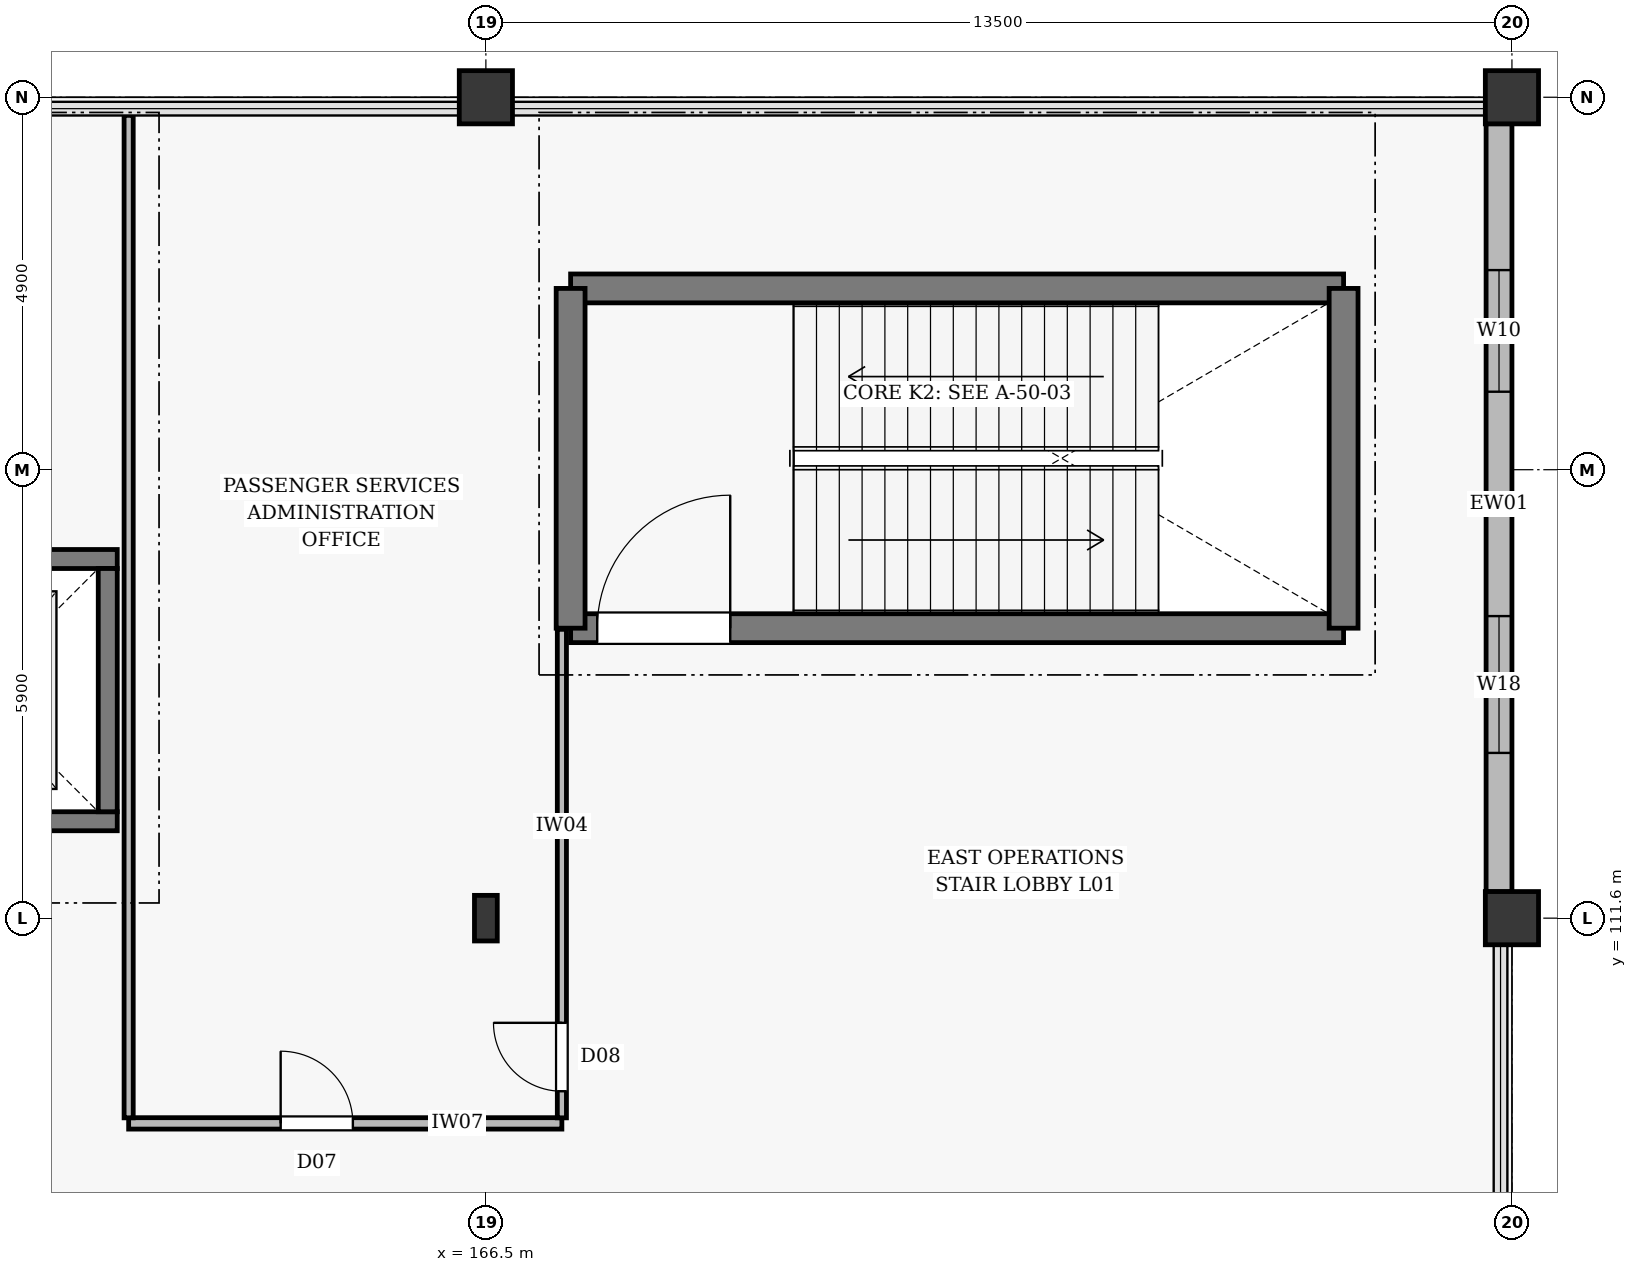
"""IFC4 building model, lengths in metres.
Left out: names, types, materials, properties, quantities, classifications, styles, units other than length and angle.
Written with IfcOpenShell. Run it as: python <this file> out.ifc"""

import sys

from ifc_helpers import new_model, si_unit, direction, frame, frame_2d, origin, origin_2d, place, context, subcontext, project, spatial, rectangle, i_section, extrude, element, fill, save


model = new_model("IFC4")
c1 = context("Model", 3, precision=1e-05, world=origin(), true_north=direction((0.0, 1.0)))
c2 = subcontext(c1, "Body", "Model", "MODEL_VIEW")
j1 = project(units=[si_unit("LENGTHUNIT", "METRE"), si_unit("PLANEANGLEUNIT", "RADIAN")], contexts=[c1])
p1 = place(None, origin())
s1 = spatial("IfcSite", under=j1, at=p1, CompositionType="ELEMENT")
p2 = place(p1, origin())
s2 = spatial("IfcBuilding", under=s1, at=p2, CompositionType="ELEMENT")
p3 = place(p2, frame((0.0, 0.0, 6.6)))
s3 = spatial("IfcBuildingStorey", under=s2, at=p3, CompositionType="ELEMENT", Elevation=6.6)
p4 = place(p3, frame((166.5, 111.6, 0.0), z_axis=(0.0, 0.0, 1.0), x_axis=(1.0, 0.0, 0.0)))
e1 = element("IfcColumn", 1, at=p4, inside=s3, PredefinedType="COLUMN", context=c2, shape_type="SweptSolid", body=[
    extrude(i_section(OverallWidth=0.3, OverallDepth=0.6, WebThickness=0.015, FlangeThickness=0.029, at=origin_2d()), origin(), (0.0, 0.0, 1.0), 6.0),
])
for number, where, z_axis, x_axis in (
    (2, (166.5, 122.4, 0.0), (0.0, 0.0, 1.0), (1.0, 0.0, 0.0)),
    (3, (180.0, 111.6, 0.0), (0.0, 0.0, 1.0), (1.0, 0.0, 0.0)),
    (4, (180.0, 122.4, 0.0), (0.0, 0.0, 1.0), (1.0, 0.0, 0.0)),
):
    element("IfcColumn", number, at=place(p3, frame(where, z_axis=z_axis, x_axis=x_axis)), inside=s3, PredefinedType="COLUMN", context=c2, shape_type="SweptSolid", body=[
        extrude(rectangle(XDim=0.7, YDim=0.7, at=origin_2d()), origin(), (0.0, 0.0, 1.0), 6.0),
    ])
p5 = place(p3, frame((179.83, 122.052, 0.0), z_axis=(0.0, 0.0, 1.0), x_axis=(0.0, -1.0, 0.0)))
e5 = element("IfcWall", 5, at=p5, inside=s3, PredefinedType="STANDARD", context=c2, shape_type="SweptSolid", body=[
    extrude(rectangle(XDim=10.104, YDim=0.34, at=frame_2d((5.052, 0.0))), origin(), (0.0, 0.0, 1.0), 5.15),
])
p6 = place(p5, frame((1.926, 0.0, 0.75)))
e6 = element("IfcOpeningElement", 6, at=p6, cuts=e5, PredefinedType="OPENING", context=c2, shape_type="SweptSolid", body=[
    extrude(rectangle(XDim=1.6, YDim=2.1, at=frame_2d((0.8, 1.05))), frame((0.0, 0.182, 0.0), z_axis=(0.0, -1.0, 0.0), x_axis=(1.0, 0.0, 0.0)), (0.0, 0.0, 1.0), 0.364),
])
p7 = place(p5, frame((6.478, 0.0, 1.05)))
e7 = element("IfcOpeningElement", 7, at=p7, cuts=e5, PredefinedType="OPENING", context=c2, shape_type="SweptSolid", body=[
    extrude(rectangle(XDim=1.8, YDim=1.1, at=frame_2d((0.9, 0.55))), frame((0.0, 0.182, 0.0), z_axis=(0.0, -1.0, 0.0), x_axis=(1.0, 0.0, 0.0)), (0.0, 0.0, 1.0), 0.364),
])
p8 = place(p3, frame((167.615, 115.415, 0.0), z_axis=(0.0, 0.0, 1.0), x_axis=(1.0, 0.0, 0.0)))
e8 = element("IfcWall", 8, at=p8, inside=s3, PredefinedType="SOLIDWALL", context=c2, shape_type="SweptSolid", body=[
    extrude(rectangle(XDim=10.17, YDim=0.38, at=frame_2d((5.085, 0.0))), origin(), (0.0, 0.0, 1.0), 6.0),
])
p9 = place(p8, frame((0.35, 0.0, 0.005)))
e9 = element("IfcOpeningElement", 9, at=p9, cuts=e8, PredefinedType="OPENING", context=c2, shape_type="SweptSolid", body=[
    extrude(rectangle(XDim=1.75, YDim=2.2, at=frame_2d((0.875, 1.1))), frame((0.0, 0.202, 0.0), z_axis=(0.0, -1.0, 0.0), x_axis=(1.0, 0.0, 0.0)), (0.0, 0.0, 1.0), 0.404),
])
p10 = place(p3, frame((167.615, 119.885, 0.0), z_axis=(0.0, 0.0, 1.0), x_axis=(1.0, 0.0, 0.0)))
e10 = element("IfcWall", 10, at=p10, inside=s3, PredefinedType="SOLIDWALL", context=c2, shape_type="SweptSolid", body=[
    extrude(rectangle(XDim=10.17, YDim=0.38, at=frame_2d((5.085, 0.0))), origin(), (0.0, 0.0, 1.0), 6.0),
])
for number, where, z_axis, x_axis in (
    (11, (167.615, 115.415, 0.0), (0.0, 0.0, 1.0), (0.0, 1.0, 0.0)),
    (12, (177.785, 115.415, 0.0), (0.0, 0.0, 1.0), (0.0, 1.0, 0.0)),
):
    element("IfcWall", number, at=place(p3, frame(where, z_axis=z_axis, x_axis=x_axis)), inside=s3, PredefinedType="SOLIDWALL", context=c2, shape_type="SweptSolid", body=[
        extrude(rectangle(XDim=4.47, YDim=0.38, at=frame_2d((2.235, 0.0))), origin(), (0.0, 0.0, 1.0), 6.0),
    ])
p11 = place(p3, frame((157.95, 112.875, 0.0), z_axis=(0.0, 0.0, 1.0), x_axis=(1.0, 0.0, 0.0)))
e13 = element("IfcWall", 13, at=p11, inside=s3, PredefinedType="SOLIDWALL", context=c2, shape_type="SweptSolid", body=[
    extrude(rectangle(XDim=3.7, YDim=0.25, at=frame_2d((1.85, 0.0))), origin(), (0.0, 0.0, 1.0), 6.0),
])
p12 = place(p11, frame((1.225, 0.0, 0.005)))
e14 = element("IfcOpeningElement", 14, at=p12, cuts=e13, PredefinedType="OPENING", context=c2, shape_type="SweptSolid", body=[
    extrude(rectangle(XDim=1.25, YDim=2.2, at=frame_2d((0.625, 1.1))), frame((0.0, 0.137, 0.0), z_axis=(0.0, -1.0, 0.0), x_axis=(1.0, 0.0, 0.0)), (0.0, 0.0, 1.0), 0.274),
])
p13 = place(p3, frame((157.95, 116.325, 0.0), z_axis=(0.0, 0.0, 1.0), x_axis=(1.0, 0.0, 0.0)))
e15 = element("IfcWall", 15, at=p13, inside=s3, PredefinedType="SOLIDWALL", context=c2, shape_type="SweptSolid", body=[
    extrude(rectangle(XDim=3.7, YDim=0.25, at=frame_2d((1.85, 0.0))), origin(), (0.0, 0.0, 1.0), 6.0),
])
p14 = place(p3, frame((161.525, 113.0, 0.0), z_axis=(0.0, 0.0, 1.0), x_axis=(0.0, 1.0, 0.0)))
e16 = element("IfcWall", 16, at=p14, inside=s3, PredefinedType="SOLIDWALL", context=c2, shape_type="SweptSolid", body=[
    extrude(rectangle(XDim=3.2, YDim=0.25, at=frame_2d((1.6, 0.0))), origin(), (0.0, 0.0, 1.0), 6.0),
])
p15 = place(p3, frame((161.8, 108.9, 0.0), z_axis=(0.0, 0.0, 1.0), x_axis=(1.0, 0.0, 0.0)))
e17 = element("IfcWall", 17, at=p15, inside=s3, PredefinedType="PARTITIONING", context=c2, shape_type="SweptSolid", body=[
    extrude(rectangle(XDim=5.7, YDim=0.15, at=frame_2d((2.85, 0.0))), origin(), (0.0, 0.0, 1.0), 5.29),
])
p16 = place(p15, frame((2.0, 0.0, 0.005)))
e18 = element("IfcOpeningElement", 18, at=p16, cuts=e17, PredefinedType="OPENING", context=c2, shape_type="SweptSolid", body=[
    extrude(rectangle(XDim=0.95, YDim=2.1, at=frame_2d((0.475, 1.05))), frame((0.0, 0.087, 0.0), z_axis=(0.0, -1.0, 0.0), x_axis=(1.0, 0.0, 0.0)), (0.0, 0.0, 1.0), 0.174),
])
p17 = place(p3, frame((167.5, 108.973, 0.0), z_axis=(0.0, 0.0, 1.0), x_axis=(0.0, 1.0, 0.0)))
e19 = element("IfcWall", 19, at=p17, inside=s3, PredefinedType="PARTITIONING", context=c2, shape_type="SweptSolid", body=[
    extrude(rectangle(XDim=6.427, YDim=0.12, at=frame_2d((3.213, 0.0))), origin(), (0.0, 0.0, 1.0), 5.14),
])
p18 = place(p17, frame((0.35, 0.0, 0.005)))
e20 = element("IfcOpeningElement", 20, at=p18, cuts=e19, PredefinedType="OPENING", context=c2, shape_type="SweptSolid", body=[
    extrude(rectangle(XDim=0.9, YDim=2.1, at=frame_2d((0.45, 1.05))), frame((0.0, 0.072, 0.0), z_axis=(0.0, -1.0, 0.0), x_axis=(1.0, 0.0, 0.0)), (0.0, 0.0, 1.0), 0.144),
])
p19 = place(p3, frame((161.8, 108.973, 0.0), z_axis=(0.0, 0.0, 1.0), x_axis=(0.0, 1.0, 0.0)))
e21 = element("IfcWall", 21, at=p19, inside=s3, PredefinedType="PARTITIONING", context=c2, shape_type="SweptSolid", body=[
    extrude(rectangle(XDim=13.189, YDim=0.12, at=frame_2d((6.595, 0.0))), origin(), (0.0, 0.0, 1.0), 5.14),
])
p20 = place(p6, origin())
e22 = element("IfcWindow", 22, at=p20, inside=s3, PartitioningType="DOUBLE_PANEL_VERTICAL", PredefinedType="WINDOW", context=c2, shape_type="SweptSolid", body=[
    extrude(rectangle(XDim=1.6, YDim=2.1, at=frame_2d((0.8, 1.05))), frame((0.0, 0.03, 0.0), z_axis=(0.0, -1.0, 0.0), x_axis=(1.0, 0.0, 0.0)), (0.0, 0.0, 1.0), 0.06),
])
fill(e6, e22)
p21 = place(p7, origin())
e23 = element("IfcWindow", 23, at=p21, inside=s3, PartitioningType="DOUBLE_PANEL_VERTICAL", PredefinedType="WINDOW", context=c2, shape_type="SweptSolid", body=[
    extrude(rectangle(XDim=1.8, YDim=1.1, at=frame_2d((0.9, 0.55))), frame((0.0, 0.03, 0.0), z_axis=(0.0, -1.0, 0.0), x_axis=(1.0, 0.0, 0.0)), (0.0, 0.0, 1.0), 0.06),
])
fill(e7, e23)
p22 = place(p9, origin())
e24 = element("IfcDoor", 24, at=p22, inside=s3, OperationType="SINGLE_SWING_RIGHT", PredefinedType="DOOR", context=c2, shape_type="SweptSolid", body=[
    extrude(rectangle(XDim=1.75, YDim=2.2, at=frame_2d((0.875, 1.1))), frame((0.0, 0.025, 0.0), z_axis=(0.0, -1.0, 0.0), x_axis=(1.0, 0.0, 0.0)), (0.0, 0.0, 1.0), 0.05),
])
fill(e9, e24)
p23 = place(p16, origin())
e25 = element("IfcDoor", 25, at=p23, inside=s3, OperationType="SINGLE_SWING_LEFT", PredefinedType="DOOR", context=c2, shape_type="SweptSolid", body=[
    extrude(rectangle(XDim=0.95, YDim=2.1, at=frame_2d((0.475, 1.05))), frame((0.0, 0.025, 0.0), z_axis=(0.0, -1.0, 0.0), x_axis=(1.0, 0.0, 0.0)), (0.0, 0.0, 1.0), 0.05),
])
fill(e18, e25)
p24 = place(p18, origin())
e26 = element("IfcDoor", 26, at=p24, inside=s3, OperationType="SINGLE_SWING_RIGHT", PredefinedType="DOOR", context=c2, shape_type="SweptSolid", body=[
    extrude(rectangle(XDim=0.9, YDim=2.1, at=frame_2d((0.45, 1.05))), frame((0.0, 0.025, 0.0), z_axis=(0.0, -1.0, 0.0), x_axis=(1.0, 0.0, 0.0)), (0.0, 0.0, 1.0), 0.05),
])
fill(e20, e26)
save(model, sys.argv[1])
